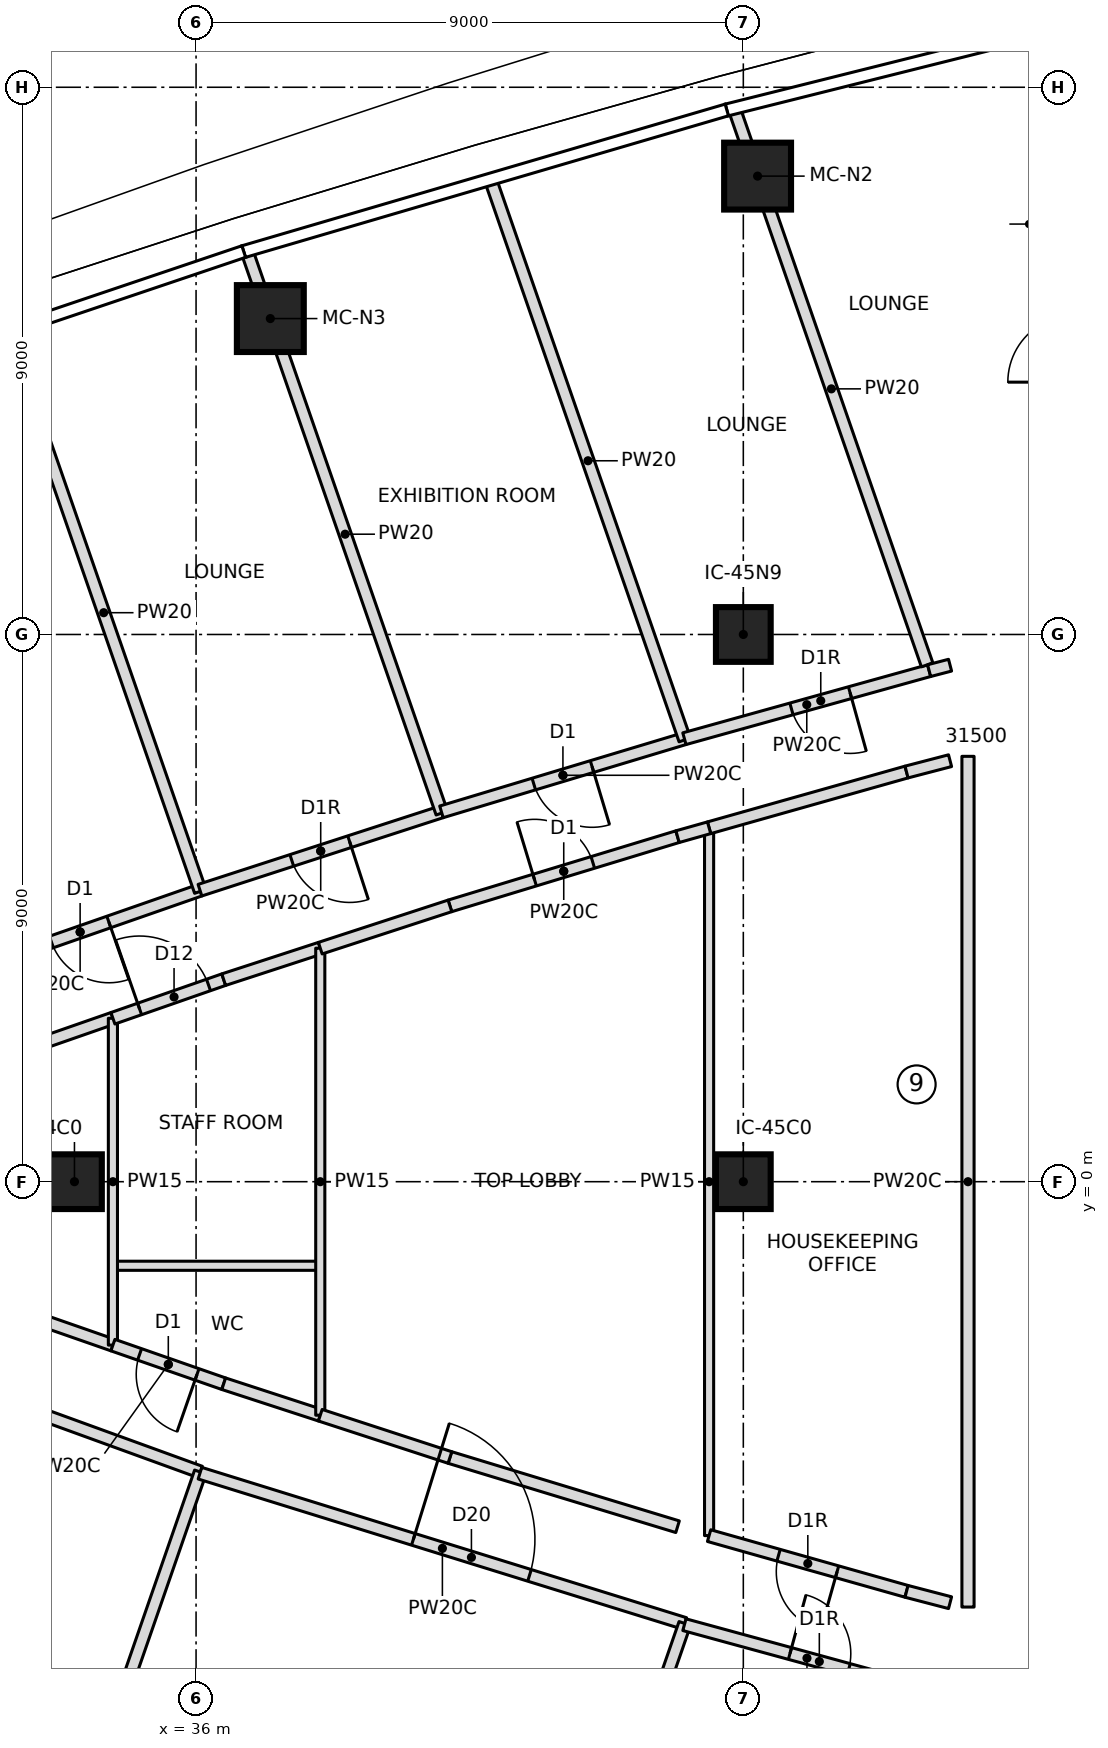
"""IFC4 building model, lengths in metres.
Left out: names, types, materials, properties, quantities, classifications, styles, units other than length and angle.
Written with IfcOpenShell. Run it as: python <this file> out.ifc"""

import sys

from ifc_helpers import new_model, si_unit, direction, frame, frame_2d, origin, origin_2d, place, context, subcontext, project, spatial, rectangle, extrude, element, fill, save


model = new_model("IFC4")
c1 = context("Model", 3, precision=1e-05, world=origin(), true_north=direction((0.0, 1.0)))
c2 = subcontext(c1, "Body", "Model", "MODEL_VIEW")
j1 = project(units=[si_unit("LENGTHUNIT", "METRE"), si_unit("PLANEANGLEUNIT", "RADIAN")], contexts=[c1])
p1 = place(None, origin())
s1 = spatial("IfcSite", under=j1, at=p1, CompositionType="ELEMENT")
p2 = place(p1, origin())
s2 = spatial("IfcBuilding", under=s1, at=p2, CompositionType="ELEMENT")
p3 = place(p2, frame((0.0, 0.0, 263.3)))
s3 = spatial("IfcBuildingStorey", under=s2, at=p3, CompositionType="ELEMENT", Elevation=263.3)
for number, where, z_axis, x_axis in (
    (1, (45.235, 16.539, 0.0), (0.0, 0.0, 1.0), (1.0, 0.0, 0.0)),
    (2, (37.221, 14.196, 0.0), (0.0, 0.0, 1.0), (1.0, 0.0, 0.0)),
):
    element("IfcColumn", number, at=place(p3, frame(where, z_axis=z_axis, x_axis=x_axis)), inside=s3, PredefinedType="COLUMN", context=c2, shape_type="SweptSolid", body=[
        extrude(rectangle(XDim=1.1, YDim=1.1, at=origin_2d()), origin(), (0.0, 0.0, 1.0), 4.6),
    ])
for number, where, z_axis, x_axis in (
    (3, (34.0, 0.0, 0.0), (0.0, 0.0, 1.0), (1.0, 0.0, 0.0)),
    (4, (45.0, 0.0, 0.0), (0.0, 0.0, 1.0), (1.0, 0.0, 0.0)),
    (5, (45.0, 9.0, 0.0), (0.0, 0.0, 1.0), (1.0, 0.0, 0.0)),
):
    element("IfcColumn", number, at=place(p3, frame(where, z_axis=z_axis, x_axis=x_axis)), inside=s3, PredefinedType="COLUMN", context=c2, shape_type="SweptSolid", body=[
        extrude(rectangle(XDim=0.9, YDim=0.9, at=origin_2d()), origin(), (0.0, 0.0, 1.0), 4.6),
    ])
p4 = place(p3, frame((36.064, 4.794, 0.0), z_axis=(0.0, 0.0, 1.0), x_axis=(-0.944236129554, -0.329269086986, 0.0)))
e6 = element("IfcWall", 6, at=p4, inside=s3, PredefinedType="PARTITIONING", context=c2, shape_type="SweptSolid", body=[
    extrude(rectangle(XDim=4.174, YDim=0.2, at=frame_2d((2.087, 0.0))), origin(), (0.0, 0.0, 1.0), 4.3),
])
p5 = place(p4, frame((1.587, 0.0, 0.0)))
e7 = element("IfcOpeningElement", 7, at=p5, cuts=e6, PredefinedType="OPENING", context=c2, shape_type="SweptSolid", body=[
    extrude(rectangle(XDim=1.0, YDim=2.1, at=frame_2d((0.5, 1.05))), frame((0.0, 0.11, 0.0), z_axis=(0.0, -1.0, 0.0), x_axis=(1.0, 0.0, 0.0)), (0.0, 0.0, 1.0), 0.22),
])
p6 = place(p3, frame((36.071, 4.775, 0.0), z_axis=(0.0, 0.0, 1.0), x_axis=(-0.327725028322, 0.94477315045, 0.0)))
e8 = element("IfcWall", 8, at=p6, inside=s3, PredefinedType="PARTITIONING", context=c2, shape_type="SweptSolid", body=[
    extrude(rectangle(XDim=9.702, YDim=0.2, at=frame_2d((4.851, 0.0))), origin(), (0.0, 0.0, 1.0), 4.3),
])
p7 = place(p3, frame((40.035, 6.083, 0.0), z_axis=(0.0, 0.0, 1.0), x_axis=(-0.951196378796, -0.308586209941, 0.0)))
e9 = element("IfcWall", 9, at=p7, inside=s3, PredefinedType="PARTITIONING", context=c2, shape_type="SweptSolid", body=[
    extrude(rectangle(XDim=4.175, YDim=0.2, at=frame_2d((2.087, 0.0))), origin(), (0.0, 0.0, 1.0), 4.3),
])
p8 = place(p7, frame((1.588, 0.0, 0.0)))
e10 = element("IfcOpeningElement", 10, at=p8, cuts=e9, PredefinedType="OPENING", context=c2, shape_type="SweptSolid", body=[
    extrude(rectangle(XDim=1.0, YDim=2.1, at=frame_2d((0.5, 1.05))), frame((0.0, 0.11, 0.0), z_axis=(0.0, -1.0, 0.0), x_axis=(1.0, 0.0, 0.0)), (0.0, 0.0, 1.0), 0.22),
])
p9 = place(p3, frame((40.042, 6.064, 0.0), z_axis=(0.0, 0.0, 1.0), x_axis=(-0.327710853631, 0.944778067279, 0.0)))
e11 = element("IfcWall", 11, at=p9, inside=s3, PredefinedType="PARTITIONING", context=c2, shape_type="SweptSolid", body=[
    extrude(rectangle(XDim=9.707, YDim=0.2, at=frame_2d((4.854, 0.0))), origin(), (0.0, 0.0, 1.0), 4.3),
])
p10 = place(p3, frame((44.031, 7.286, 0.0), z_axis=(0.0, 0.0, 1.0), x_axis=(-0.957521424208, -0.288362137222, 0.0)))
e12 = element("IfcWall", 12, at=p10, inside=s3, PredefinedType="PARTITIONING", context=c2, shape_type="SweptSolid", body=[
    extrude(rectangle(XDim=4.173, YDim=0.2, at=frame_2d((2.086, 0.0))), origin(), (0.0, 0.0, 1.0), 4.3),
])
p11 = place(p10, frame((1.586, 0.0, 0.0)))
e13 = element("IfcOpeningElement", 13, at=p11, cuts=e12, PredefinedType="OPENING", context=c2, shape_type="SweptSolid", body=[
    extrude(rectangle(XDim=1.0, YDim=2.1, at=frame_2d((0.5, 1.05))), frame((0.0, 0.11, 0.0), z_axis=(0.0, -1.0, 0.0), x_axis=(1.0, 0.0, 0.0)), (0.0, 0.0, 1.0), 0.22),
])
p12 = place(p3, frame((44.038, 7.267, 0.0), z_axis=(0.0, 0.0, 1.0), x_axis=(-0.327714576096, 0.944776776077, 0.0)))
e14 = element("IfcWall", 14, at=p12, inside=s3, PredefinedType="PARTITIONING", context=c2, shape_type="SweptSolid", body=[
    extrude(rectangle(XDim=9.717, YDim=0.2, at=frame_2d((4.858, 0.0))), origin(), (0.0, 0.0, 1.0), 4.3),
])
p13 = place(p3, frame((48.056, 8.405, 0.0), z_axis=(0.0, 0.0, 1.0), x_axis=(-0.963429942227, -0.267960344866, 0.0)))
e15 = element("IfcWall", 15, at=p13, inside=s3, PredefinedType="PARTITIONING", context=c2, shape_type="SweptSolid", body=[
    extrude(rectangle(XDim=4.177, YDim=0.2, at=frame_2d((2.089, 0.0))), origin(), (0.0, 0.0, 1.0), 4.3),
])
p14 = place(p13, frame((1.35, 0.0, 0.0)))
e16 = element("IfcOpeningElement", 16, at=p14, cuts=e15, PredefinedType="OPENING", context=c2, shape_type="SweptSolid", body=[
    extrude(rectangle(XDim=1.0, YDim=2.1, at=frame_2d((0.5, 1.05))), frame((0.0, 0.11, 0.0), z_axis=(0.0, -1.0, 0.0), x_axis=(1.0, 0.0, 0.0)), (0.0, 0.0, 1.0), 0.22),
])
p15 = place(p3, frame((48.023, 8.5, 0.0), z_axis=(0.0, 0.0, 1.0), x_axis=(-0.327705598625, 0.944779890043, 0.0)))
e17 = element("IfcWall", 17, at=p15, inside=s3, PredefinedType="PARTITIONING", context=c2, shape_type="SweptSolid", body=[
    extrude(rectangle(XDim=9.61, YDim=0.2, at=frame_2d((4.805, 0.0))), origin(), (0.0, 0.0, 1.0), 4.3),
])
p16 = place(p3, frame((26.85, -1.423, 0.0), z_axis=(0.0, 0.0, 1.0), x_axis=(0.939807953272, -0.341703103536, 0.0)))
e18 = element("IfcWall", 18, at=p16, inside=s3, PredefinedType="PARTITIONING", context=c2, shape_type="SweptSolid", body=[
    extrude(rectangle(XDim=9.811, YDim=0.2, at=frame_2d((4.906, 0.0))), origin(), (0.0, 0.0, 1.0), 4.3),
])
p17 = place(p16, frame((4.406, 0.0, 0.0)))
e19 = element("IfcOpeningElement", 19, at=p17, cuts=e18, PredefinedType="OPENING", context=c2, shape_type="SweptSolid", body=[
    extrude(rectangle(XDim=2.0, YDim=2.4, at=frame_2d((1.0, 1.2))), frame((0.0, 0.11, 0.0), z_axis=(0.0, -1.0, 0.0), x_axis=(1.0, 0.0, 0.0)), (0.0, 0.0, 1.0), 0.22),
])
p18 = place(p3, frame((32.891, -13.941, 0.0), z_axis=(0.0, 0.0, 1.0), x_axis=(0.327725028322, 0.94477315045, 0.0)))
e20 = element("IfcWall", 20, at=p18, inside=s3, PredefinedType="PARTITIONING", context=c2, shape_type="SweptSolid", body=[
    extrude(rectangle(XDim=9.702, YDim=0.2, at=frame_2d((4.851, 0.0))), origin(), (0.0, 0.0, 1.0), 4.3),
])
p19 = place(p3, frame((36.064, -4.794, 0.0), z_axis=(0.0, 0.0, 1.0), x_axis=(0.955129200503, -0.296189483855, 0.0)))
e21 = element("IfcWall", 21, at=p19, inside=s3, PredefinedType="PARTITIONING", context=c2, shape_type="SweptSolid", body=[
    extrude(rectangle(XDim=8.348, YDim=0.2, at=frame_2d((4.174, 0.0))), origin(), (0.0, 0.0, 1.0), 4.3),
])
p20 = place(p19, frame((3.674, 0.0, 0.0)))
e22 = element("IfcOpeningElement", 22, at=p20, cuts=e21, PredefinedType="OPENING", context=c2, shape_type="SweptSolid", body=[
    extrude(rectangle(XDim=2.0, YDim=2.4, at=frame_2d((1.0, 1.2))), frame((0.0, 0.11, 0.0), z_axis=(0.0, -1.0, 0.0), x_axis=(1.0, 0.0, 0.0)), (0.0, 0.0, 1.0), 0.22),
])
p21 = place(p3, frame((40.854, -16.447, 0.0), z_axis=(0.0, 0.0, 1.0), x_axis=(0.327714576096, 0.944776776077, 0.0)))
e23 = element("IfcWall", 23, at=p21, inside=s3, PredefinedType="PARTITIONING", context=c2, shape_type="SweptSolid", body=[
    extrude(rectangle(XDim=9.717, YDim=0.2, at=frame_2d((4.858, 0.0))), origin(), (0.0, 0.0, 1.0), 4.3),
])
p22 = place(p3, frame((44.031, -7.286, 0.0), z_axis=(0.0, 0.0, 1.0), x_axis=(0.964708521199, -0.263320088726, 0.0)))
e24 = element("IfcWall", 24, at=p22, inside=s3, PredefinedType="PARTITIONING", context=c2, shape_type="SweptSolid", body=[
    extrude(rectangle(XDim=4.179, YDim=0.2, at=frame_2d((2.089, 0.0))), origin(), (0.0, 0.0, 1.0), 4.3),
])
p23 = place(p22, frame((1.8, 0.0, 0.0)))
e25 = element("IfcOpeningElement", 25, at=p23, cuts=e24, PredefinedType="OPENING", context=c2, shape_type="SweptSolid", body=[
    extrude(rectangle(XDim=1.0, YDim=2.1, at=frame_2d((0.5, 1.05))), frame((0.0, 0.11, 0.0), z_axis=(0.0, -1.0, 0.0), x_axis=(1.0, 0.0, 0.0)), (0.0, 0.0, 1.0), 0.22),
])
for number, where, z_axis, x_axis in (
    (26, (32.76, 2.035, 0.0), (0.0, 0.0, 1.0), (0.944, 0.329, 0.0)),
    (27, (34.632, -2.688, 0.0), (0.0, 0.0, 1.0), (-0.944, 0.329, 0.0)),
):
    element("IfcWall", number, at=place(p3, frame(where, z_axis=z_axis, x_axis=x_axis)), inside=s3, PredefinedType="PARTITIONING", context=c2, shape_type="SweptSolid", body=[
        extrude(rectangle(XDim=1.983, YDim=0.2, at=frame_2d((0.991, 0.0))), origin(), (0.0, 0.0, 1.0), 4.3),
    ])
p24 = place(p3, frame((34.632, -1.383, 0.0), z_axis=(0.0, 0.0, 1.0), x_axis=(1.0, 0.0, 0.0)))
e28 = element("IfcWall", 28, at=p24, inside=s3, PredefinedType="PARTITIONING", context=c2, shape_type="SweptSolid", body=[
    extrude(rectangle(XDim=3.41, YDim=0.15, at=frame_2d((1.705, 0.0))), origin(), (0.0, 0.0, 1.0), 4.3),
])
p25 = place(p3, frame((34.632, -2.688, 0.0), z_axis=(0.0, 0.0, 1.0), x_axis=(0.0, 1.0, 0.0)))
e29 = element("IfcWall", 29, at=p25, inside=s3, PredefinedType="PARTITIONING", context=c2, shape_type="SweptSolid", body=[
    extrude(rectangle(XDim=5.375, YDim=0.15, at=frame_2d((2.688, 0.0))), origin(), (0.0, 0.0, 1.0), 4.3),
])
p26 = place(p3, frame((36.455, -3.323, 0.0), z_axis=(0.0, 0.0, 1.0), x_axis=(-0.944267869157, 0.329178054066, 0.0)))
e30 = element("IfcWall", 30, at=p26, inside=s3, PredefinedType="PARTITIONING", context=c2, shape_type="SweptSolid", body=[
    extrude(rectangle(XDim=1.93, YDim=0.2, at=frame_2d((0.965, 0.0))), origin(), (0.0, 0.0, 1.0), 4.3),
])
p27 = place(p26, frame((0.465, 0.0, 0.0)))
e31 = element("IfcOpeningElement", 31, at=p27, cuts=e30, PredefinedType="OPENING", context=c2, shape_type="SweptSolid", body=[
    extrude(rectangle(XDim=1.0, YDim=2.1, at=frame_2d((0.5, 1.05))), frame((0.0, 0.11, 0.0), z_axis=(0.0, -1.0, 0.0), x_axis=(1.0, 0.0, 0.0)), (0.0, 0.0, 1.0), 0.22),
])
p28 = place(p3, frame((38.043, -3.841, 0.0), z_axis=(0.0, 0.0, 1.0), x_axis=(-0.950695184954, 0.31012685357, 0.0)))
e32 = element("IfcWall", 32, at=p28, inside=s3, PredefinedType="PARTITIONING", context=c2, shape_type="SweptSolid", body=[
    extrude(rectangle(XDim=1.67, YDim=0.2, at=frame_2d((0.835, 0.0))), origin(), (0.0, 0.0, 1.0), 4.3),
])
p29 = place(p3, frame((34.632, 2.688, 0.0), z_axis=(0.0, 0.0, 1.0), x_axis=(0.944267869157, 0.329178054066, 0.0)))
e33 = element("IfcWall", 33, at=p29, inside=s3, PredefinedType="PARTITIONING", context=c2, shape_type="SweptSolid", body=[
    extrude(rectangle(XDim=1.93, YDim=0.2, at=frame_2d((0.965, 0.0))), origin(), (0.0, 0.0, 1.0), 4.3),
])
p30 = place(p29, frame((0.465, 0.0, 0.0)))
e34 = element("IfcOpeningElement", 34, at=p30, cuts=e33, PredefinedType="OPENING", context=c2, shape_type="SweptSolid", body=[
    extrude(rectangle(XDim=1.2, YDim=2.1, at=frame_2d((0.6, 1.05))), frame((0.0, 0.11, 0.0), z_axis=(0.0, -1.0, 0.0), x_axis=(1.0, 0.0, 0.0)), (0.0, 0.0, 1.0), 0.22),
])
p31 = place(p3, frame((36.455, 3.323, 0.0), z_axis=(0.0, 0.0, 1.0), x_axis=(0.950695184954, 0.31012685357, 0.0)))
e35 = element("IfcWall", 35, at=p31, inside=s3, PredefinedType="PARTITIONING", context=c2, shape_type="SweptSolid", body=[
    extrude(rectangle(XDim=1.67, YDim=0.2, at=frame_2d((0.835, 0.0))), origin(), (0.0, 0.0, 1.0), 4.3),
])
p32 = place(p3, frame((38.043, -3.841, 0.0), z_axis=(0.0, 0.0, 1.0), x_axis=(0.0, 1.0, 0.0)))
e36 = element("IfcWall", 36, at=p32, inside=s3, PredefinedType="PARTITIONING", context=c2, shape_type="SweptSolid", body=[
    extrude(rectangle(XDim=7.682, YDim=0.15, at=frame_2d((3.841, 0.0))), origin(), (0.0, 0.0, 1.0), 4.3),
])
p33 = place(p3, frame((40.175, 4.536, 0.0), z_axis=(0.0, 0.0, 1.0), x_axis=(0.956723737069, 0.29099775073, 0.0)))
e37 = element("IfcWall", 37, at=p33, inside=s3, PredefinedType="PARTITIONING", context=c2, shape_type="SweptSolid", body=[
    extrude(rectangle(XDim=3.913, YDim=0.2, at=frame_2d((1.957, 0.0))), origin(), (0.0, 0.0, 1.0), 4.3),
])
p34 = place(p33, frame((1.457, 0.0, 0.0)))
e38 = element("IfcOpeningElement", 38, at=p34, cuts=e37, PredefinedType="OPENING", context=c2, shape_type="SweptSolid", body=[
    extrude(rectangle(XDim=1.0, YDim=2.1, at=frame_2d((0.5, 1.05))), frame((0.0, 0.11, 0.0), z_axis=(0.0, -1.0, 0.0), x_axis=(1.0, 0.0, 0.0)), (0.0, 0.0, 1.0), 0.22),
])
p35 = place(p3, frame((43.918, -5.675, 0.0), z_axis=(0.0, 0.0, 1.0), x_axis=(-0.956723737069, 0.29099775073, 0.0)))
e39 = element("IfcWall", 39, at=p35, inside=s3, PredefinedType="PARTITIONING", context=c2, shape_type="SweptSolid", body=[
    extrude(rectangle(XDim=3.913, YDim=0.2, at=frame_2d((1.957, 0.0))), origin(), (0.0, 0.0, 1.0), 4.3),
])
for number, where, z_axis, x_axis in (
    (40, (40.175, -4.536, 0.0), (0.0, 0.0, 1.0), (-0.951, 0.31, 0.0)),
    (41, (38.043, 3.841, 0.0), (0.0, 0.0, 1.0), (0.951, 0.31, 0.0)),
):
    element("IfcWall", number, at=place(p3, frame(where, z_axis=z_axis, x_axis=x_axis)), inside=s3, PredefinedType="PARTITIONING", context=c2, shape_type="SweptSolid", body=[
        extrude(rectangle(XDim=2.243, YDim=0.2, at=frame_2d((1.121, 0.0))), origin(), (0.0, 0.0, 1.0), 4.3),
    ])
p36 = place(p3, frame((44.437, -5.821, 0.0), z_axis=(0.0, 0.0, 1.0), x_axis=(0.0, 1.0, 0.0)))
e42 = element("IfcWall", 42, at=p36, inside=s3, PredefinedType="PARTITIONING", context=c2, shape_type="SweptSolid", body=[
    extrude(rectangle(XDim=11.642, YDim=0.15, at=frame_2d((5.821, 0.0))), origin(), (0.0, 0.0, 1.0), 4.3),
])
p37 = place(p3, frame((47.684, -6.738, 0.0), z_axis=(0.0, 0.0, 1.0), x_axis=(-0.962403613575, 0.271623424206, 0.0)))
e43 = element("IfcWall", 43, at=p37, inside=s3, PredefinedType="PARTITIONING", context=c2, shape_type="SweptSolid", body=[
    extrude(rectangle(XDim=3.374, YDim=0.2, at=frame_2d((1.687, 0.0))), origin(), (0.0, 0.0, 1.0), 4.3),
])
p38 = place(p37, frame((1.187, 0.0, 0.0)))
e44 = element("IfcOpeningElement", 44, at=p38, cuts=e43, PredefinedType="OPENING", context=c2, shape_type="SweptSolid", body=[
    extrude(rectangle(XDim=1.0, YDim=2.1, at=frame_2d((0.5, 1.05))), frame((0.0, 0.11, 0.0), z_axis=(0.0, -1.0, 0.0), x_axis=(1.0, 0.0, 0.0)), (0.0, 0.0, 1.0), 0.22),
])
p39 = place(p3, frame((44.437, 5.821, 0.0), z_axis=(0.0, 0.0, 1.0), x_axis=(0.962403613575, 0.271623424206, 0.0)))
e45 = element("IfcWall", 45, at=p39, inside=s3, PredefinedType="PARTITIONING", context=c2, shape_type="SweptSolid", body=[
    extrude(rectangle(XDim=3.374, YDim=0.2, at=frame_2d((1.687, 0.0))), origin(), (0.0, 0.0, 1.0), 4.3),
])
p40 = place(p3, frame((48.4, 8.495, 0.0), z_axis=(0.0, 0.0, 1.0), x_axis=(-0.96754430933, -0.252701423587, 0.0)))
e46 = element("IfcWall", 46, at=p40, inside=s3, PredefinedType="PARTITIONING", context=c2, shape_type="SweptSolid", body=[
    extrude(rectangle(XDim=0.355, YDim=0.2, at=frame_2d((0.178, 0.0))), origin(), (0.0, 0.0, 1.0), 4.3),
])
for number, where, z_axis, x_axis in (
    (47, (47.684, 6.738, 0.0), (0.0, 0.0, 1.0), (0.968, 0.253, 0.0)),
    (48, (48.4, -6.924, 0.0), (0.0, 0.0, 1.0), (-0.968, 0.253, 0.0)),
):
    element("IfcWall", number, at=place(p3, frame(where, z_axis=z_axis, x_axis=x_axis)), inside=s3, PredefinedType="PARTITIONING", context=c2, shape_type="SweptSolid", body=[
        extrude(rectangle(XDim=0.74, YDim=0.2, at=frame_2d((0.37, 0.0))), origin(), (0.0, 0.0, 1.0), 4.3),
    ])
p41 = place(p3, frame((48.695, 6.996, 0.0), z_axis=(0.0, 0.0, 1.0), x_axis=(0.0, -1.0, 0.0)))
e49 = element("IfcWall", 49, at=p41, inside=s3, PredefinedType="PARTITIONING", context=c2, shape_type="SweptSolid", body=[
    extrude(rectangle(XDim=13.992, YDim=0.2, at=frame_2d((6.996, 0.0))), origin(), (0.0, 0.0, 1.0), 4.3),
])
p42 = place(p3, frame((43.918, 5.675, 0.0), z_axis=(0.0, 0.0, 1.0), x_axis=(0.9624587823, 0.271427876929, 0.0)))
e50 = element("IfcWall", 50, at=p42, inside=s3, PredefinedType="PARTITIONING", context=c2, shape_type="SweptSolid", body=[
    extrude(rectangle(XDim=0.539, YDim=0.2, at=frame_2d((0.27, 0.0))), origin(), (0.0, 0.0, 1.0), 4.3),
])
p43 = place(p5, origin())
e51 = element("IfcDoor", 51, at=p43, inside=s3, OperationType="SINGLE_SWING_LEFT", PredefinedType="DOOR", context=c2, shape_type="SweptSolid", body=[
    extrude(rectangle(XDim=1.0, YDim=2.1, at=frame_2d((0.5, 1.05))), frame((0.0, 0.025, 0.0), z_axis=(0.0, -1.0, 0.0), x_axis=(1.0, 0.0, 0.0)), (0.0, 0.0, 1.0), 0.05),
])
fill(e7, e51)
p44 = place(p8, origin())
e52 = element("IfcDoor", 52, at=p44, inside=s3, OperationType="SINGLE_SWING_RIGHT", PredefinedType="DOOR", context=c2, shape_type="SweptSolid", body=[
    extrude(rectangle(XDim=1.0, YDim=2.1, at=frame_2d((0.5, 1.05))), frame((0.0, 0.025, 0.0), z_axis=(0.0, -1.0, 0.0), x_axis=(1.0, 0.0, 0.0)), (0.0, 0.0, 1.0), 0.05),
])
fill(e10, e52)
p45 = place(p11, origin())
e53 = element("IfcDoor", 53, at=p45, inside=s3, OperationType="SINGLE_SWING_LEFT", PredefinedType="DOOR", context=c2, shape_type="SweptSolid", body=[
    extrude(rectangle(XDim=1.0, YDim=2.1, at=frame_2d((0.5, 1.05))), frame((0.0, 0.025, 0.0), z_axis=(0.0, -1.0, 0.0), x_axis=(1.0, 0.0, 0.0)), (0.0, 0.0, 1.0), 0.05),
])
fill(e13, e53)
p46 = place(p14, origin())
e54 = element("IfcDoor", 54, at=p46, inside=s3, OperationType="SINGLE_SWING_RIGHT", PredefinedType="DOOR", context=c2, shape_type="SweptSolid", body=[
    extrude(rectangle(XDim=1.0, YDim=2.1, at=frame_2d((0.5, 1.05))), frame((0.0, 0.025, 0.0), z_axis=(0.0, -1.0, 0.0), x_axis=(1.0, 0.0, 0.0)), (0.0, 0.0, 1.0), 0.05),
])
fill(e16, e54)
p47 = place(p20, origin())
e55 = element("IfcDoor", 55, at=p47, inside=s3, OperationType="DOUBLE_DOOR_SINGLE_SWING", PredefinedType="DOOR", context=c2, shape_type="SweptSolid", body=[
    extrude(rectangle(XDim=2.0, YDim=2.4, at=frame_2d((1.0, 1.2))), frame((0.0, 0.025, 0.0), z_axis=(0.0, -1.0, 0.0), x_axis=(1.0, 0.0, 0.0)), (0.0, 0.0, 1.0), 0.05),
])
fill(e22, e55)
p48 = place(p23, origin())
e56 = element("IfcDoor", 56, at=p48, inside=s3, OperationType="SINGLE_SWING_RIGHT", PredefinedType="DOOR", context=c2, shape_type="SweptSolid", body=[
    extrude(rectangle(XDim=1.0, YDim=2.1, at=frame_2d((0.5, 1.05))), frame((0.0, 0.025, 0.0), z_axis=(0.0, -1.0, 0.0), x_axis=(1.0, 0.0, 0.0)), (0.0, 0.0, 1.0), 0.05),
])
fill(e25, e56)
p49 = place(p27, origin())
e57 = element("IfcDoor", 57, at=p49, inside=s3, OperationType="SINGLE_SWING_LEFT", PredefinedType="DOOR", context=c2, shape_type="SweptSolid", body=[
    extrude(rectangle(XDim=1.0, YDim=2.1, at=frame_2d((0.5, 1.05))), frame((0.0, 0.025, 0.0), z_axis=(0.0, -1.0, 0.0), x_axis=(1.0, 0.0, 0.0)), (0.0, 0.0, 1.0), 0.05),
])
fill(e31, e57)
p50 = place(p30, origin())
e58 = element("IfcDoor", 58, at=p50, inside=s3, OperationType="SINGLE_SWING_RIGHT", PredefinedType="DOOR", context=c2, shape_type="SweptSolid", body=[
    extrude(rectangle(XDim=1.2, YDim=2.1, at=frame_2d((0.6, 1.05))), frame((0.0, 0.025, 0.0), z_axis=(0.0, -1.0, 0.0), x_axis=(1.0, 0.0, 0.0)), (0.0, 0.0, 1.0), 0.05),
])
fill(e34, e58)
p51 = place(p34, origin())
e59 = element("IfcDoor", 59, at=p51, inside=s3, OperationType="SINGLE_SWING_LEFT", PredefinedType="DOOR", context=c2, shape_type="SweptSolid", body=[
    extrude(rectangle(XDim=1.0, YDim=2.1, at=frame_2d((0.5, 1.05))), frame((0.0, 0.025, 0.0), z_axis=(0.0, -1.0, 0.0), x_axis=(1.0, 0.0, 0.0)), (0.0, 0.0, 1.0), 0.05),
])
fill(e38, e59)
p52 = place(p38, origin())
e60 = element("IfcDoor", 60, at=p52, inside=s3, OperationType="SINGLE_SWING_RIGHT", PredefinedType="DOOR", context=c2, shape_type="SweptSolid", body=[
    extrude(rectangle(XDim=1.0, YDim=2.1, at=frame_2d((0.5, 1.05))), frame((0.0, 0.025, 0.0), z_axis=(0.0, -1.0, 0.0), x_axis=(1.0, 0.0, 0.0)), (0.0, 0.0, 1.0), 0.05),
])
fill(e44, e60)
save(model, sys.argv[1])
